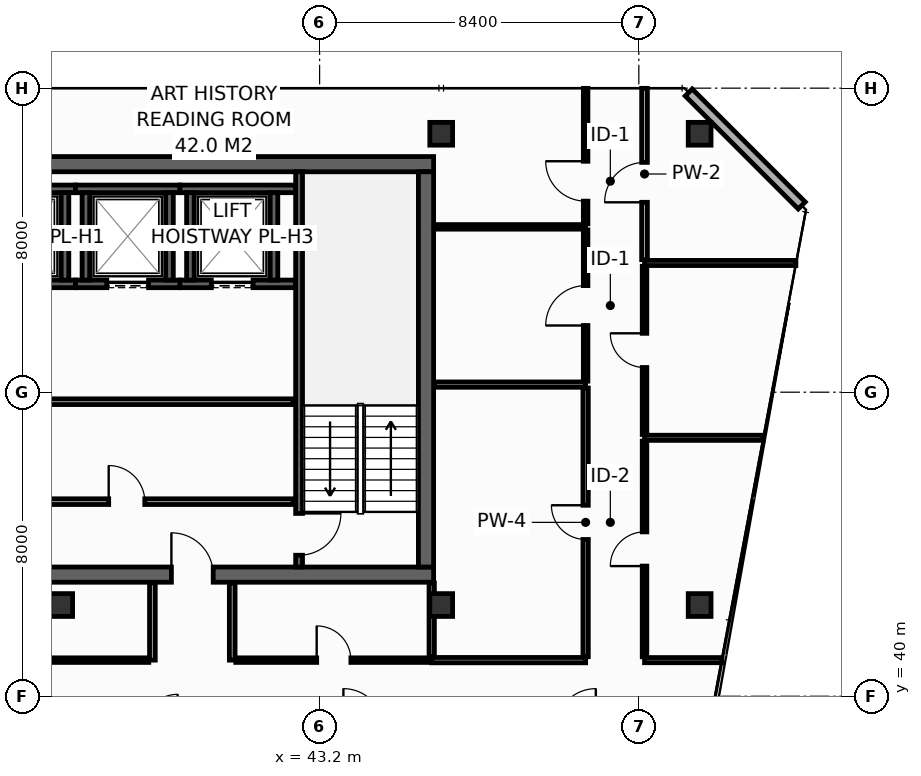
"""IFC4 building model, lengths in metres.
Left out: names, types, materials, properties, quantities, classifications, styles, units other than length and angle.
Written with IfcOpenShell. Run it as: python <this file> out.ifc"""

import sys

from ifc_helpers import new_model, si_unit, direction, frame, frame_2d, origin, origin_2d, place, context, subcontext, project, spatial, rectangle, hollow_rectangle, extrude, element, fill, save


model = new_model("IFC4")
c1 = context("Model", 3, precision=1e-05, world=origin(), true_north=direction((0.0, 1.0)))
c2 = subcontext(c1, "Body", "Model", "MODEL_VIEW")
j1 = project(units=[si_unit("LENGTHUNIT", "METRE"), si_unit("PLANEANGLEUNIT", "RADIAN")], contexts=[c1])
p1 = place(None, origin())
s1 = spatial("IfcSite", under=j1, at=p1, CompositionType="ELEMENT")
p2 = place(p1, origin())
s2 = spatial("IfcBuilding", under=s1, at=p2, CompositionType="ELEMENT")
p3 = place(p2, frame((0.0, 0.0, 276.2)))
s3 = spatial("IfcBuildingStorey", under=s2, at=p3, CompositionType="ELEMENT", Elevation=276.2)
p4 = place(p3, frame((13.7, 43.2, 0.0), z_axis=(0.0, 0.0, 1.0), x_axis=(1.0, 0.0, 0.0)))
e1 = element("IfcWall", 1, at=p4, inside=s3, PredefinedType="SHEAR", context=c2, shape_type="SweptSolid", body=[
    extrude(rectangle(XDim=32.5, YDim=0.4, at=frame_2d((16.25, 0.0))), origin(), (0.0, 0.0, 1.0), 3.55),
])
p5 = place(p4, frame((5.4, 0.0, 0.0)))
e2 = element("IfcOpeningElement", 2, at=p5, cuts=e1, PredefinedType="OPENING", context=c2, shape_type="SweptSolid", body=[
    extrude(rectangle(XDim=1.1, YDim=2.15, at=frame_2d((0.55, 1.075))), frame((0.0, 0.21, 0.0), z_axis=(0.0, -1.0, 0.0), x_axis=(1.0, 0.0, 0.0)), (0.0, 0.0, 1.0), 0.42),
])
p6 = place(p4, frame((25.6, 0.0, 0.0)))
e3 = element("IfcOpeningElement", 3, at=p6, cuts=e1, PredefinedType="OPENING", context=c2, shape_type="SweptSolid", body=[
    extrude(rectangle(XDim=1.1, YDim=2.15, at=frame_2d((0.55, 1.075))), frame((0.0, 0.21, 0.0), z_axis=(0.0, -1.0, 0.0), x_axis=(1.0, 0.0, 0.0)), (0.0, 0.0, 1.0), 0.42),
])
p7 = place(p3, frame((13.7, 54.0, 0.0), z_axis=(0.0, 0.0, 1.0), x_axis=(1.0, 0.0, 0.0)))
e4 = element("IfcWall", 4, at=p7, inside=s3, PredefinedType="SHEAR", context=c2, shape_type="SweptSolid", body=[
    extrude(rectangle(XDim=32.5, YDim=0.4, at=frame_2d((16.25, 0.0))), origin(), (0.0, 0.0, 1.0), 3.55),
])
p8 = place(p3, frame((46.0, 43.4, 0.0), z_axis=(0.0, 0.0, 1.0), x_axis=(0.0, 1.0, 0.0)))
e5 = element("IfcWall", 5, at=p8, inside=s3, PredefinedType="SHEAR", context=c2, shape_type="SweptSolid", body=[
    extrude(rectangle(XDim=10.4, YDim=0.4, at=frame_2d((5.2, 0.0))), origin(), (0.0, 0.0, 1.0), 3.55),
])
for number, where, z_axis, x_axis in (
    (6, (46.4, 54.8, 0.0), (0.0, 0.0, 1.0), (1.0, 0.0, 0.0)),
    (7, (53.2, 54.8, 0.0), (0.0, 0.0, 1.0), (1.0, 0.0, 0.0)),
    (8, (36.4, 42.4, 0.0), (0.0, 0.0, 1.0), (1.0, 0.0, 0.0)),
    (9, (46.4, 42.4, 0.0), (0.0, 0.0, 1.0), (1.0, 0.0, 0.0)),
    (10, (53.2, 42.4, 0.0), (0.0, 0.0, 1.0), (1.0, 0.0, 0.0)),
):
    element("IfcColumn", number, at=place(p3, frame(where, z_axis=z_axis, x_axis=x_axis)), inside=s3, PredefinedType="COLUMN", context=c2, shape_type="SweptSolid", body=[
        extrude(hollow_rectangle(XDim=0.6, YDim=0.6, WallThickness=0.028, at=origin_2d()), origin(), (0.0, 0.0, 1.0), 3.8),
    ])
p9 = place(p3, frame((34.2, 50.85, 0.0), z_axis=(0.0, 0.0, 1.0), x_axis=(1.0, 0.0, 0.0)))
e11 = element("IfcWall", 11, at=p9, inside=s3, PredefinedType="SHEAR", context=c2, shape_type="SweptSolid", body=[
    extrude(rectangle(XDim=2.575, YDim=0.2, at=frame_2d((1.288, 0.0))), origin(), (0.0, 0.0, 1.0), 3.55),
])
p10 = place(p9, frame((0.65, 0.0, 0.0)))
e12 = element("IfcOpeningElement", 12, at=p10, cuts=e11, PredefinedType="OPENING", context=c2, shape_type="SweptSolid", body=[
    extrude(rectangle(XDim=1.1, YDim=2.2, at=frame_2d((0.55, 1.1))), frame((0.0, 0.11, 0.0), z_axis=(0.0, -1.0, 0.0), x_axis=(1.0, 0.0, 0.0)), (0.0, 0.0, 1.0), 0.22),
])
p11 = place(p3, frame((34.2, 53.35, 0.0), z_axis=(0.0, 0.0, 1.0), x_axis=(1.0, 0.0, 0.0)))
e13 = element("IfcWall", 13, at=p11, inside=s3, PredefinedType="SHEAR", context=c2, shape_type="SweptSolid", body=[
    extrude(rectangle(XDim=2.575, YDim=0.2, at=frame_2d((1.288, 0.0))), origin(), (0.0, 0.0, 1.0), 3.55),
])
p12 = place(p3, frame((36.5, 50.95, 0.0), z_axis=(0.0, 0.0, 1.0), x_axis=(0.0, 1.0, 0.0)))
e14 = element("IfcWall", 14, at=p12, inside=s3, PredefinedType="SHEAR", context=c2, shape_type="SweptSolid", body=[
    extrude(rectangle(XDim=2.3, YDim=0.2, at=frame_2d((1.15, 0.0))), origin(), (0.0, 0.0, 1.0), 3.55),
])
p13 = place(p3, frame((36.775, 50.85, 0.0), z_axis=(0.0, 0.0, 1.0), x_axis=(1.0, 0.0, 0.0)))
e15 = element("IfcWall", 15, at=p13, inside=s3, PredefinedType="SHEAR", context=c2, shape_type="SweptSolid", body=[
    extrude(rectangle(XDim=2.75, YDim=0.2, at=frame_2d((1.375, 0.0))), origin(), (0.0, 0.0, 1.0), 3.55),
])
p14 = place(p13, frame((0.825, 0.0, 0.0)))
e16 = element("IfcOpeningElement", 16, at=p14, cuts=e15, PredefinedType="OPENING", context=c2, shape_type="SweptSolid", body=[
    extrude(rectangle(XDim=1.1, YDim=2.2, at=frame_2d((0.55, 1.1))), frame((0.0, 0.11, 0.0), z_axis=(0.0, -1.0, 0.0), x_axis=(1.0, 0.0, 0.0)), (0.0, 0.0, 1.0), 0.22),
])
p15 = place(p3, frame((36.775, 53.35, 0.0), z_axis=(0.0, 0.0, 1.0), x_axis=(1.0, 0.0, 0.0)))
e17 = element("IfcWall", 17, at=p15, inside=s3, PredefinedType="SHEAR", context=c2, shape_type="SweptSolid", body=[
    extrude(rectangle(XDim=2.75, YDim=0.2, at=frame_2d((1.375, 0.0))), origin(), (0.0, 0.0, 1.0), 3.55),
])
for number, where, z_axis, x_axis in (
    (18, (37.05, 50.95, 0.0), (0.0, 0.0, 1.0), (0.0, 1.0, 0.0)),
    (19, (39.25, 50.95, 0.0), (0.0, 0.0, 1.0), (0.0, 1.0, 0.0)),
):
    element("IfcWall", number, at=place(p3, frame(where, z_axis=z_axis, x_axis=x_axis)), inside=s3, PredefinedType="SHEAR", context=c2, shape_type="SweptSolid", body=[
        extrude(rectangle(XDim=2.3, YDim=0.2, at=frame_2d((1.15, 0.0))), origin(), (0.0, 0.0, 1.0), 3.55),
    ])
p16 = place(p3, frame((39.525, 50.85, 0.0), z_axis=(0.0, 0.0, 1.0), x_axis=(1.0, 0.0, 0.0)))
e20 = element("IfcWall", 20, at=p16, inside=s3, PredefinedType="SHEAR", context=c2, shape_type="SweptSolid", body=[
    extrude(rectangle(XDim=3.045, YDim=0.2, at=frame_2d((1.522, 0.0))), origin(), (0.0, 0.0, 1.0), 3.55),
])
p17 = place(p16, frame((0.825, 0.0, 0.0)))
e21 = element("IfcOpeningElement", 21, at=p17, cuts=e20, PredefinedType="OPENING", context=c2, shape_type="SweptSolid", body=[
    extrude(rectangle(XDim=1.1, YDim=2.2, at=frame_2d((0.55, 1.1))), frame((0.0, 0.11, 0.0), z_axis=(0.0, -1.0, 0.0), x_axis=(1.0, 0.0, 0.0)), (0.0, 0.0, 1.0), 0.22),
])
p18 = place(p3, frame((39.525, 53.35, 0.0), z_axis=(0.0, 0.0, 1.0), x_axis=(1.0, 0.0, 0.0)))
e22 = element("IfcWall", 22, at=p18, inside=s3, PredefinedType="SHEAR", context=c2, shape_type="SweptSolid", body=[
    extrude(rectangle(XDim=3.045, YDim=0.2, at=frame_2d((1.522, 0.0))), origin(), (0.0, 0.0, 1.0), 3.55),
])
for number, where, z_axis, x_axis in (
    (23, (39.8, 50.95, 0.0), (0.0, 0.0, 1.0), (0.0, 1.0, 0.0)),
    (24, (42.0, 50.95, 0.0), (0.0, 0.0, 1.0), (0.0, 1.0, 0.0)),
):
    element("IfcWall", number, at=place(p3, frame(where, z_axis=z_axis, x_axis=x_axis)), inside=s3, PredefinedType="SHEAR", context=c2, shape_type="SweptSolid", body=[
        extrude(rectangle(XDim=2.3, YDim=0.2, at=frame_2d((1.15, 0.0))), origin(), (0.0, 0.0, 1.0), 3.55),
    ])
p19 = place(p3, frame((42.66, 53.8, 0.0), z_axis=(0.0, 0.0, 1.0), x_axis=(0.0, -1.0, 0.0)))
e25 = element("IfcWall", 25, at=p19, inside=s3, PredefinedType="SHEAR", context=c2, shape_type="SweptSolid", body=[
    extrude(rectangle(XDim=10.4, YDim=0.18, at=frame_2d((5.2, 0.0))), origin(), (0.0, 0.0, 1.0), 3.55),
])
p20 = place(p19, frame((8.99, 0.0, 0.0)))
e26 = element("IfcOpeningElement", 26, at=p20, cuts=e25, PredefinedType="OPENING", context=c2, shape_type="SweptSolid", body=[
    extrude(rectangle(XDim=1.1, YDim=2.15, at=frame_2d((0.55, 1.075))), frame((0.0, 0.1, 0.0), z_axis=(0.0, -1.0, 0.0), x_axis=(1.0, 0.0, 0.0)), (0.0, 0.0, 1.0), 0.2),
])
p21 = place(p3, frame((34.05, 45.12, 0.0), z_axis=(0.0, 0.0, 1.0), x_axis=(1.0, 0.0, 0.0)))
e27 = element("IfcWall", 27, at=p21, inside=s3, PredefinedType="PARTITIONING", context=c2, shape_type="SweptSolid", body=[
    extrude(rectangle(XDim=8.45, YDim=0.15, at=frame_2d((4.225, 0.0))), origin(), (0.0, 0.0, 1.0), 3.55),
])
p22 = place(p21, frame((3.6, 0.0, 0.0)))
e28 = element("IfcOpeningElement", 28, at=p22, cuts=e27, PredefinedType="OPENING", context=c2, shape_type="SweptSolid", body=[
    extrude(rectangle(XDim=0.95, YDim=2.15, at=frame_2d((0.475, 1.075))), frame((0.0, 0.085, 0.0), z_axis=(0.0, -1.0, 0.0), x_axis=(1.0, 0.0, 0.0)), (0.0, 0.0, 1.0), 0.17),
])
p23 = place(p3, frame((34.05, 47.75, 0.0), z_axis=(0.0, 0.0, 1.0), x_axis=(1.0, 0.0, 0.0)))
e29 = element("IfcWall", 29, at=p23, inside=s3, PredefinedType="PARTITIONING", context=c2, shape_type="SweptSolid", body=[
    extrude(rectangle(XDim=8.45, YDim=0.15, at=frame_2d((4.225, 0.0))), origin(), (0.0, 0.0, 1.0), 3.55),
])
p24 = place(p3, frame((55.887, 52.913, 0.0), z_axis=(0.0, 0.0, 1.0), x_axis=(-0.707106781187, 0.707106781187, 0.0)))
e30 = element("IfcWall", 30, at=p24, inside=s3, PredefinedType="STANDARD", context=c2, shape_type="SweptSolid", body=[
    extrude(rectangle(XDim=4.206, YDim=0.26, at=frame_2d((2.103, 0.0))), origin(), (0.0, 0.0, 1.0), 3.55),
])
p25 = place(p3, frame((46.15, 40.95, 0.0), z_axis=(0.0, 0.0, 1.0), x_axis=(1.0, 0.0, 0.0)))
e31 = element("IfcWall", 31, at=p25, inside=s3, PredefinedType="PARTITIONING", context=c2, shape_type="SweptSolid", body=[
    extrude(rectangle(XDim=4.05, YDim=0.14, at=frame_2d((2.025, 0.0))), origin(), (0.0, 0.0, 1.0), 3.55),
])
p26 = place(p3, frame((46.15, 41.04, 0.0), z_axis=(0.0, 0.0, 1.0), x_axis=(0.0, 1.0, 0.0)))
e32 = element("IfcWall", 32, at=p26, inside=s3, PredefinedType="PARTITIONING", context=c2, shape_type="SweptSolid", body=[
    extrude(rectangle(XDim=1.94, YDim=0.14, at=frame_2d((0.97, 0.0))), origin(), (0.0, 0.0, 1.0), 3.55),
])
p27 = place(p3, frame((46.22, 48.2, 0.0), z_axis=(0.0, 0.0, 1.0), x_axis=(1.0, 0.0, 0.0)))
e33 = element("IfcWall", 33, at=p27, inside=s3, PredefinedType="PARTITIONING", context=c2, shape_type="SweptSolid", body=[
    extrude(rectangle(XDim=3.98, YDim=0.14, at=frame_2d((1.99, 0.0))), origin(), (0.0, 0.0, 1.0), 3.55),
])
p28 = place(p3, frame((50.2, 41.04, 0.0), z_axis=(0.0, 0.0, 1.0), x_axis=(0.0, 1.0, 0.0)))
e34 = element("IfcWall", 34, at=p28, inside=s3, PredefinedType="PARTITIONING", context=c2, shape_type="SweptSolid", body=[
    extrude(rectangle(XDim=7.07, YDim=0.14, at=frame_2d((3.535, 0.0))), origin(), (0.0, 0.0, 1.0), 2.947),
])
p29 = place(p28, frame((3.085, 0.0, 0.0)))
e35 = element("IfcOpeningElement", 35, at=p29, cuts=e34, PredefinedType="OPENING", context=c2, shape_type="SweptSolid", body=[
    extrude(rectangle(XDim=0.9, YDim=2.1, at=frame_2d((0.45, 1.05))), frame((0.0, 0.08, 0.0), z_axis=(0.0, -1.0, 0.0), x_axis=(1.0, 0.0, 0.0)), (0.0, 0.0, 1.0), 0.16),
])
p30 = place(p3, frame((46.22, 52.35, 0.0), z_axis=(0.0, 0.0, 1.0), x_axis=(1.0, 0.0, 0.0)))
e36 = element("IfcWall", 36, at=p30, inside=s3, PredefinedType="PARTITIONING", context=c2, shape_type="SweptSolid", body=[
    extrude(rectangle(XDim=3.98, YDim=0.12, at=frame_2d((1.99, 0.0))), origin(), (0.0, 0.0, 1.0), 3.55),
])
p31 = place(p3, frame((50.2, 48.29, 0.0), z_axis=(0.0, 0.0, 1.0), x_axis=(0.0, 1.0, 0.0)))
e37 = element("IfcWall", 37, at=p31, inside=s3, PredefinedType="PARTITIONING", context=c2, shape_type="SweptSolid", body=[
    extrude(rectangle(XDim=3.98, YDim=0.12, at=frame_2d((1.99, 0.0))), origin(), (0.0, 0.0, 1.0), 3.55),
])
p32 = place(p31, frame((1.465, 0.0, 0.0)))
e38 = element("IfcOpeningElement", 38, at=p32, cuts=e37, PredefinedType="OPENING", context=c2, shape_type="SweptSolid", body=[
    extrude(rectangle(XDim=1.05, YDim=2.15, at=frame_2d((0.525, 1.075))), frame((0.0, 0.07, 0.0), z_axis=(0.0, -1.0, 0.0), x_axis=(1.0, 0.0, 0.0)), (0.0, 0.0, 1.0), 0.14),
])
p33 = place(p3, frame((50.2, 52.43, 0.0), z_axis=(0.0, 0.0, 1.0), x_axis=(0.0, 1.0, 0.0)))
e39 = element("IfcWall", 39, at=p33, inside=s3, PredefinedType="PARTITIONING", context=c2, shape_type="SweptSolid", body=[
    extrude(rectangle(XDim=3.565, YDim=0.12, at=frame_2d((1.783, 0.0))), origin(), (0.0, 0.0, 1.0), 2.935),
])
p34 = place(p33, frame((0.597, 0.0, 0.0)))
e40 = element("IfcOpeningElement", 40, at=p34, cuts=e39, PredefinedType="OPENING", context=c2, shape_type="SweptSolid", body=[
    extrude(rectangle(XDim=1.05, YDim=2.15, at=frame_2d((0.525, 1.075))), frame((0.0, 0.07, 0.0), z_axis=(0.0, -1.0, 0.0), x_axis=(1.0, 0.0, 0.0)), (0.0, 0.0, 1.0), 0.14),
])
p35 = place(p3, frame((51.75, 40.95, 0.0), z_axis=(0.0, 0.0, 1.0), x_axis=(1.0, 0.0, 0.0)))
e41 = element("IfcWall", 41, at=p35, inside=s3, PredefinedType="PARTITIONING", context=c2, shape_type="SweptSolid", body=[
    extrude(rectangle(XDim=2.026, YDim=0.135, at=frame_2d((1.013, 0.0))), origin(), (0.0, 0.0, 1.0), 3.085),
])
p36 = place(p3, frame((51.75, 46.8, 0.0), z_axis=(0.0, 0.0, 1.0), x_axis=(1.0, 0.0, 0.0)))
e42 = element("IfcWall", 42, at=p36, inside=s3, PredefinedType="PARTITIONING", context=c2, shape_type="SweptSolid", body=[
    extrude(rectangle(XDim=3.122, YDim=0.135, at=frame_2d((1.561, 0.0))), origin(), (0.0, 0.0, 1.0), 2.947),
])
p37 = place(p3, frame((51.75, 51.4, 0.0), z_axis=(0.0, 0.0, 1.0), x_axis=(1.0, 0.0, 0.0)))
e43 = element("IfcWall", 43, at=p37, inside=s3, PredefinedType="PARTITIONING", context=c2, shape_type="SweptSolid", body=[
    extrude(rectangle(XDim=3.983, YDim=0.135, at=frame_2d((1.991, 0.0))), origin(), (0.0, 0.0, 1.0), 2.947),
])
p38 = place(p3, frame((51.75, 41.038, 0.0), z_axis=(0.0, 0.0, 1.0), x_axis=(0.0, 1.0, 0.0)))
e44 = element("IfcWall", 44, at=p38, inside=s3, PredefinedType="PARTITIONING", context=c2, shape_type="SweptSolid", body=[
    extrude(rectangle(XDim=5.675, YDim=0.12, at=frame_2d((2.837, 0.0))), origin(), (0.0, 0.0, 1.0), 2.947),
])
p39 = place(p38, frame((2.387, 0.0, 0.0)))
e45 = element("IfcOpeningElement", 45, at=p39, cuts=e44, PredefinedType="OPENING", context=c2, shape_type="SweptSolid", body=[
    extrude(rectangle(XDim=0.9, YDim=2.1, at=frame_2d((0.45, 1.05))), frame((0.0, 0.07, 0.0), z_axis=(0.0, -1.0, 0.0), x_axis=(1.0, 0.0, 0.0)), (0.0, 0.0, 1.0), 0.14),
])
p40 = place(p3, frame((51.75, 46.887, 0.0), z_axis=(0.0, 0.0, 1.0), x_axis=(0.0, 1.0, 0.0)))
e46 = element("IfcWall", 46, at=p40, inside=s3, PredefinedType="PARTITIONING", context=c2, shape_type="SweptSolid", body=[
    extrude(rectangle(XDim=4.425, YDim=0.12, at=frame_2d((2.212, 0.0))), origin(), (0.0, 0.0, 1.0), 3.55),
])
p41 = place(p40, frame((1.762, 0.0, 0.0)))
e47 = element("IfcOpeningElement", 47, at=p41, cuts=e46, PredefinedType="OPENING", context=c2, shape_type="SweptSolid", body=[
    extrude(rectangle(XDim=0.9, YDim=2.1, at=frame_2d((0.45, 1.05))), frame((0.0, 0.07, 0.0), z_axis=(0.0, -1.0, 0.0), x_axis=(1.0, 0.0, 0.0)), (0.0, 0.0, 1.0), 0.14),
])
p42 = place(p3, frame((51.75, 51.488, 0.0), z_axis=(0.0, 0.0, 1.0), x_axis=(0.0, 1.0, 0.0)))
e48 = element("IfcWall", 48, at=p42, inside=s3, PredefinedType="PARTITIONING", context=c2, shape_type="SweptSolid", body=[
    extrude(rectangle(XDim=4.508, YDim=0.15, at=frame_2d((2.254, 0.0))), origin(), (0.0, 0.0, 1.0), 2.935),
])
p43 = place(p42, frame((1.509, 0.0, 0.0)))
e49 = element("IfcOpeningElement", 49, at=p43, cuts=e48, PredefinedType="OPENING", context=c2, shape_type="SweptSolid", body=[
    extrude(rectangle(XDim=1.05, YDim=2.15, at=frame_2d((0.525, 1.075))), frame((0.0, 0.085, 0.0), z_axis=(0.0, -1.0, 0.0), x_axis=(1.0, 0.0, 0.0)), (0.0, 0.0, 1.0), 0.17),
])
for number, where, z_axis, x_axis in (
    (50, (38.8, 40.95, 0.0), (0.0, 0.0, 1.0), (0.0, 1.0, 0.0)),
    (51, (40.9, 40.95, 0.0), (0.0, 0.0, 1.0), (0.0, 1.0, 0.0)),
):
    element("IfcWall", number, at=place(p3, frame(where, z_axis=z_axis, x_axis=x_axis)), inside=s3, PredefinedType="PARTITIONING", context=c2, shape_type="SweptSolid", body=[
        extrude(rectangle(XDim=2.03, YDim=0.15, at=frame_2d((1.015, 0.0))), origin(), (0.0, 0.0, 1.0), 3.55),
    ])
p44 = place(p3, frame((30.08, 40.95, 0.0), z_axis=(0.0, 0.0, 1.0), x_axis=(1.0, 0.0, 0.0)))
e52 = element("IfcWall", 52, at=p44, inside=s3, PredefinedType="PARTITIONING", context=c2, shape_type="SweptSolid", body=[
    extrude(rectangle(XDim=8.625, YDim=0.12, at=frame_2d((4.312, 0.0))), origin(), (0.0, 0.0, 1.0), 2.947),
])
p45 = place(p44, frame((3.862, 0.0, 0.0)))
e53 = element("IfcOpeningElement", 53, at=p45, cuts=e52, PredefinedType="OPENING", context=c2, shape_type="SweptSolid", body=[
    extrude(rectangle(XDim=0.9, YDim=2.1, at=frame_2d((0.45, 1.05))), frame((0.0, 0.07, 0.0), z_axis=(0.0, -1.0, 0.0), x_axis=(1.0, 0.0, 0.0)), (0.0, 0.0, 1.0), 0.14),
])
p46 = place(p3, frame((40.995, 40.95, 0.0), z_axis=(0.0, 0.0, 1.0), x_axis=(1.0, 0.0, 0.0)))
e54 = element("IfcWall", 54, at=p46, inside=s3, PredefinedType="PARTITIONING", context=c2, shape_type="SweptSolid", body=[
    extrude(rectangle(XDim=5.155, YDim=0.12, at=frame_2d((2.577, 0.0))), origin(), (0.0, 0.0, 1.0), 3.55),
])
p47 = place(p46, frame((2.128, 0.0, 0.0)))
e55 = element("IfcOpeningElement", 55, at=p47, cuts=e54, PredefinedType="OPENING", context=c2, shape_type="SweptSolid", body=[
    extrude(rectangle(XDim=0.9, YDim=2.1, at=frame_2d((0.45, 1.05))), frame((0.0, 0.07, 0.0), z_axis=(0.0, -1.0, 0.0), x_axis=(1.0, 0.0, 0.0)), (0.0, 0.0, 1.0), 0.14),
])
p48 = place(p14, origin())
e56 = element("IfcDoor", 56, at=p48, inside=s3, OperationType="SLIDING_TO_LEFT", PredefinedType="DOOR", context=c2, shape_type="SweptSolid", body=[
    extrude(rectangle(XDim=1.1, YDim=2.2, at=frame_2d((0.55, 1.1))), frame((0.0, 0.025, 0.0), z_axis=(0.0, -1.0, 0.0), x_axis=(1.0, 0.0, 0.0)), (0.0, 0.0, 1.0), 0.05),
])
fill(e16, e56)
p49 = place(p17, origin())
e57 = element("IfcDoor", 57, at=p49, inside=s3, OperationType="SLIDING_TO_LEFT", PredefinedType="DOOR", context=c2, shape_type="SweptSolid", body=[
    extrude(rectangle(XDim=1.1, YDim=2.2, at=frame_2d((0.55, 1.1))), frame((0.0, 0.025, 0.0), z_axis=(0.0, -1.0, 0.0), x_axis=(1.0, 0.0, 0.0)), (0.0, 0.0, 1.0), 0.05),
])
fill(e21, e57)
p50 = place(p20, origin())
e58 = element("IfcDoor", 58, at=p50, inside=s3, OperationType="SINGLE_SWING_LEFT", PredefinedType="DOOR", context=c2, shape_type="SweptSolid", body=[
    extrude(rectangle(XDim=1.1, YDim=2.15, at=frame_2d((0.55, 1.075))), frame((0.0, 0.025, 0.0), z_axis=(0.0, -1.0, 0.0), x_axis=(1.0, 0.0, 0.0)), (0.0, 0.0, 1.0), 0.05),
])
fill(e26, e58)
p51 = place(p6, origin())
e59 = element("IfcDoor", 59, at=p51, inside=s3, OperationType="SINGLE_SWING_LEFT", PredefinedType="DOOR", context=c2, shape_type="SweptSolid", body=[
    extrude(rectangle(XDim=1.1, YDim=2.15, at=frame_2d((0.55, 1.075))), frame((0.0, 0.025, 0.0), z_axis=(0.0, -1.0, 0.0), x_axis=(1.0, 0.0, 0.0)), (0.0, 0.0, 1.0), 0.05),
])
fill(e3, e59)
p52 = place(p22, origin())
e60 = element("IfcDoor", 60, at=p52, inside=s3, OperationType="SINGLE_SWING_LEFT", PredefinedType="DOOR", context=c2, shape_type="SweptSolid", body=[
    extrude(rectangle(XDim=0.95, YDim=2.15, at=frame_2d((0.475, 1.075))), frame((0.0, 0.025, 0.0), z_axis=(0.0, -1.0, 0.0), x_axis=(1.0, 0.0, 0.0)), (0.0, 0.0, 1.0), 0.05),
])
fill(e28, e60)
p53 = place(p29, origin())
e61 = element("IfcDoor", 61, at=p53, inside=s3, OperationType="SINGLE_SWING_RIGHT", PredefinedType="DOOR", context=c2, shape_type="SweptSolid", body=[
    extrude(rectangle(XDim=0.9, YDim=2.1, at=frame_2d((0.45, 1.05))), frame((0.0, 0.025, 0.0), z_axis=(0.0, -1.0, 0.0), x_axis=(1.0, 0.0, 0.0)), (0.0, 0.0, 1.0), 0.05),
])
fill(e35, e61)
p54 = place(p32, origin())
e62 = element("IfcDoor", 62, at=p54, inside=s3, OperationType="SINGLE_SWING_LEFT", PredefinedType="DOOR", context=c2, shape_type="SweptSolid", body=[
    extrude(rectangle(XDim=1.05, YDim=2.15, at=frame_2d((0.525, 1.075))), frame((0.0, 0.025, 0.0), z_axis=(0.0, -1.0, 0.0), x_axis=(1.0, 0.0, 0.0)), (0.0, 0.0, 1.0), 0.05),
])
fill(e38, e62)
p55 = place(p34, origin())
e63 = element("IfcDoor", 63, at=p55, inside=s3, OperationType="SINGLE_SWING_RIGHT", PredefinedType="DOOR", context=c2, shape_type="SweptSolid", body=[
    extrude(rectangle(XDim=1.05, YDim=2.15, at=frame_2d((0.525, 1.075))), frame((0.0, 0.025, 0.0), z_axis=(0.0, -1.0, 0.0), x_axis=(1.0, 0.0, 0.0)), (0.0, 0.0, 1.0), 0.05),
])
fill(e40, e63)
p56 = place(p39, origin())
e64 = element("IfcDoor", 64, at=p56, inside=s3, OperationType="SINGLE_SWING_LEFT", PredefinedType="DOOR", context=c2, shape_type="SweptSolid", body=[
    extrude(rectangle(XDim=0.9, YDim=2.1, at=frame_2d((0.45, 1.05))), frame((0.0, 0.025, 0.0), z_axis=(0.0, -1.0, 0.0), x_axis=(1.0, 0.0, 0.0)), (0.0, 0.0, 1.0), 0.05),
])
fill(e45, e64)
p57 = place(p41, origin())
e65 = element("IfcDoor", 65, at=p57, inside=s3, OperationType="SINGLE_SWING_RIGHT", PredefinedType="DOOR", context=c2, shape_type="SweptSolid", body=[
    extrude(rectangle(XDim=0.9, YDim=2.1, at=frame_2d((0.45, 1.05))), frame((0.0, 0.025, 0.0), z_axis=(0.0, -1.0, 0.0), x_axis=(1.0, 0.0, 0.0)), (0.0, 0.0, 1.0), 0.05),
])
fill(e47, e65)
p58 = place(p43, origin())
e66 = element("IfcDoor", 66, at=p58, inside=s3, OperationType="SINGLE_SWING_LEFT", PredefinedType="DOOR", context=c2, shape_type="SweptSolid", body=[
    extrude(rectangle(XDim=1.05, YDim=2.15, at=frame_2d((0.525, 1.075))), frame((0.0, 0.025, 0.0), z_axis=(0.0, -1.0, 0.0), x_axis=(1.0, 0.0, 0.0)), (0.0, 0.0, 1.0), 0.05),
])
fill(e49, e66)
p59 = place(p47, origin())
e67 = element("IfcDoor", 67, at=p59, inside=s3, OperationType="SINGLE_SWING_LEFT", PredefinedType="DOOR", context=c2, shape_type="SweptSolid", body=[
    extrude(rectangle(XDim=0.9, YDim=2.1, at=frame_2d((0.45, 1.05))), frame((0.0, 0.025, 0.0), z_axis=(0.0, -1.0, 0.0), x_axis=(1.0, 0.0, 0.0)), (0.0, 0.0, 1.0), 0.05),
])
fill(e55, e67)
save(model, sys.argv[1])
